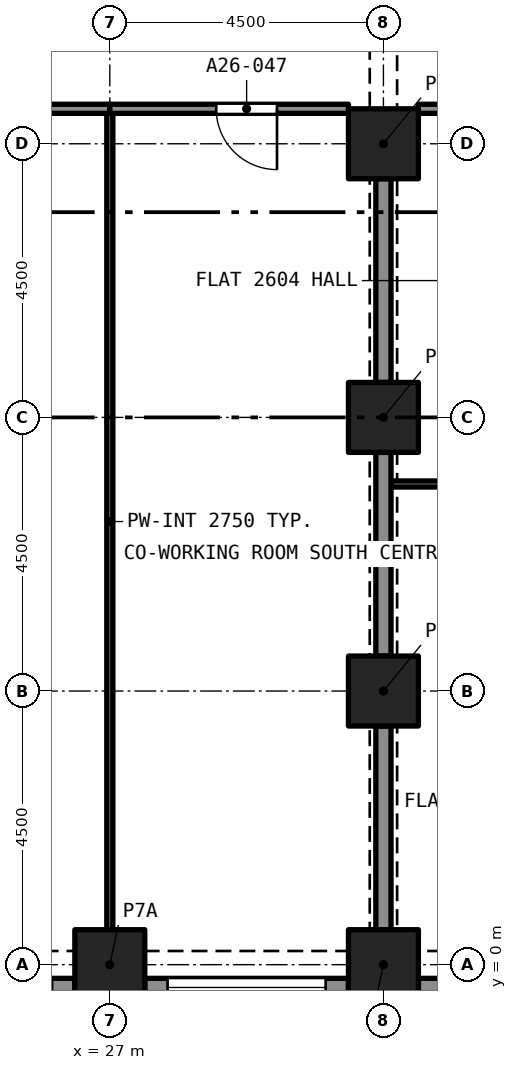
"""IFC4 building model, lengths in metres.
Left out: names, types, materials, properties, quantities, classifications, styles, units other than length and angle.
Written with IfcOpenShell. Run it as: python <this file> out.ifc"""

import sys

from ifc_helpers import new_model, si_unit, direction, frame, frame_2d, origin, origin_2d, place, context, subcontext, project, spatial, rectangle, extrude, element, fill, save


model = new_model("IFC4")
c1 = context("Model", 3, precision=1e-05, world=origin(), true_north=direction((0.0, 1.0)))
c2 = subcontext(c1, "Body", "Model", "MODEL_VIEW")
j1 = project(units=[si_unit("LENGTHUNIT", "METRE"), si_unit("PLANEANGLEUNIT", "RADIAN")], contexts=[c1])
p1 = place(None, origin())
s1 = spatial("IfcSite", under=j1, at=p1, CompositionType="ELEMENT")
p2 = place(p1, origin())
s2 = spatial("IfcBuilding", under=s1, at=p2, CompositionType="ELEMENT")
p3 = place(p2, frame((0.0, 0.0, 96.0)))
s3 = spatial("IfcBuildingStorey", under=s2, at=p3, CompositionType="ELEMENT", Elevation=96.0)
for number, where, z_axis, x_axis in (
    (1, (27.0, 0.0, 0.0), (0.0, 0.0, 1.0), (1.0, 0.0, 0.0)),
    (2, (31.5, 0.0, 0.0), (0.0, 0.0, 1.0), (1.0, 0.0, 0.0)),
    (3, (31.5, 4.5, 0.0), (0.0, 0.0, 1.0), (1.0, 0.0, 0.0)),
    (4, (31.5, 9.0, 0.0), (0.0, 0.0, 1.0), (1.0, 0.0, 0.0)),
    (5, (31.5, 13.5, 0.0), (0.0, 0.0, 1.0), (1.0, 0.0, 0.0)),
):
    element("IfcColumn", number, at=place(p3, frame(where, z_axis=z_axis, x_axis=x_axis)), inside=s3, PredefinedType="COLUMN", context=c2, shape_type="SweptSolid", body=[
        extrude(rectangle(XDim=1.15, YDim=1.15, at=origin_2d()), origin(), (0.0, 0.0, 1.0), 3.2),
    ])
p4 = place(p3, frame((26.425, -0.375, 0.0), z_axis=(0.0, 0.0, 1.0), x_axis=(-1.0, 0.0, 0.0)))
e6 = element("IfcWall", 6, at=p4, inside=s3, PredefinedType="SOLIDWALL", context=c2, shape_type="SweptSolid", body=[
    extrude(rectangle(XDim=3.35, YDim=0.3, at=frame_2d((1.675, 0.0))), origin(), (0.0, 0.0, 1.0), 3.2),
])
p5 = place(p4, frame((0.375, 0.0, 0.45)))
e7 = element("IfcOpeningElement", 7, at=p5, cuts=e6, PredefinedType="OPENING", context=c2, shape_type="SweptSolid", body=[
    extrude(rectangle(XDim=2.6, YDim=1.95, at=frame_2d((1.3, 0.975))), frame((0.0, 0.16, 0.0), z_axis=(0.0, -1.0, 0.0), x_axis=(1.0, 0.0, 0.0)), (0.0, 0.0, 1.0), 0.32),
])
p6 = place(p3, frame((30.925, -0.375, 0.0), z_axis=(0.0, 0.0, 1.0), x_axis=(-1.0, 0.0, 0.0)))
e8 = element("IfcWall", 8, at=p6, inside=s3, PredefinedType="SOLIDWALL", context=c2, shape_type="SweptSolid", body=[
    extrude(rectangle(XDim=3.35, YDim=0.3, at=frame_2d((1.675, 0.0))), origin(), (0.0, 0.0, 1.0), 3.2),
])
p7 = place(p6, frame((0.375, 0.0, 0.45)))
e9 = element("IfcOpeningElement", 9, at=p7, cuts=e8, PredefinedType="OPENING", context=c2, shape_type="SweptSolid", body=[
    extrude(rectangle(XDim=2.6, YDim=1.95, at=frame_2d((1.3, 0.975))), frame((0.0, 0.16, 0.0), z_axis=(0.0, -1.0, 0.0), x_axis=(1.0, 0.0, 0.0)), (0.0, 0.0, 1.0), 0.32),
])
p8 = place(p3, frame((35.425, -0.375, 0.0), z_axis=(0.0, 0.0, 1.0), x_axis=(-1.0, 0.0, 0.0)))
e10 = element("IfcWall", 10, at=p8, inside=s3, PredefinedType="SOLIDWALL", context=c2, shape_type="SweptSolid", body=[
    extrude(rectangle(XDim=3.35, YDim=0.3, at=frame_2d((1.675, 0.0))), origin(), (0.0, 0.0, 1.0), 3.2),
])
p9 = place(p8, frame((0.375, 0.0, 0.45)))
e11 = element("IfcOpeningElement", 11, at=p9, cuts=e10, PredefinedType="OPENING", context=c2, shape_type="SweptSolid", body=[
    extrude(rectangle(XDim=2.6, YDim=1.95, at=frame_2d((1.3, 0.975))), frame((0.0, 0.16, 0.0), z_axis=(0.0, -1.0, 0.0), x_axis=(1.0, 0.0, 0.0)), (0.0, 0.0, 1.0), 0.32),
])
p10 = place(p3, frame((36.0, 7.905, 0.0), z_axis=(0.0, 0.0, 1.0), x_axis=(-1.0, 0.0, 0.0)))
e12 = element("IfcWall", 12, at=p10, inside=s3, PredefinedType="PARTITIONING", context=c2, shape_type="SweptSolid", body=[
    extrude(rectangle(XDim=4.375, YDim=0.1, at=frame_2d((2.188, 0.0))), origin(), (0.0, 0.0, 1.0), 2.9),
])
p11 = place(p10, frame((1.75, 0.0, 0.0)))
e13 = element("IfcOpeningElement", 13, at=p11, cuts=e12, PredefinedType="OPENING", context=c2, shape_type="SweptSolid", body=[
    extrude(rectangle(XDim=1.0, YDim=2.1, at=frame_2d((0.5, 1.05))), frame((0.0, 0.06, 0.0), z_axis=(0.0, -1.0, 0.0), x_axis=(1.0, 0.0, 0.0)), (0.0, 0.0, 1.0), 0.12),
])
p12 = place(p3, frame((31.5, 9.575, 0.0), z_axis=(0.0, 0.0, 1.0), x_axis=(0.0, 1.0, 0.0)))
e14 = element("IfcWall", 14, at=p12, inside=s3, PredefinedType="PARTITIONING", context=c2, shape_type="SweptSolid", body=[
    extrude(rectangle(XDim=3.35, YDim=0.25, at=frame_2d((1.675, 0.0))), origin(), (0.0, 0.0, 1.0), 2.38),
])
p13 = place(p3, frame((34.425, 14.075, 0.0), z_axis=(0.0, 0.0, 1.0), x_axis=(-1.0, 0.0, 0.0)))
e15 = element("IfcWall", 15, at=p13, inside=s3, PredefinedType="PARTITIONING", context=c2, shape_type="SweptSolid", body=[
    extrude(rectangle(XDim=2.35, YDim=0.15, at=frame_2d((1.175, 0.0))), origin(), (0.0, 0.0, 1.0), 2.9),
])
p14 = place(p13, frame((0.175, 0.0, 0.0)))
e16 = element("IfcOpeningElement", 16, at=p14, cuts=e15, PredefinedType="OPENING", context=c2, shape_type="SweptSolid", body=[
    extrude(rectangle(XDim=1.0, YDim=2.1, at=frame_2d((0.5, 1.05))), frame((0.0, 0.085, 0.0), z_axis=(0.0, -1.0, 0.0), x_axis=(1.0, 0.0, 0.0)), (0.0, 0.0, 1.0), 0.17),
])
for number, where, z_axis, x_axis in (
    (17, (31.5, 0.575, 0.0), (0.0, 0.0, 1.0), (0.0, 1.0, 0.0)),
    (18, (31.5, 5.075, 0.0), (0.0, 0.0, 1.0), (0.0, 1.0, 0.0)),
):
    element("IfcWall", number, at=place(p3, frame(where, z_axis=z_axis, x_axis=x_axis)), inside=s3, PredefinedType="PARTITIONING", context=c2, shape_type="SweptSolid", body=[
        extrude(rectangle(XDim=3.35, YDim=0.25, at=frame_2d((1.675, 0.0))), origin(), (0.0, 0.0, 1.0), 2.38),
    ])
p15 = place(p3, frame((27.0, 0.575, 0.0), z_axis=(0.0, 0.0, 1.0), x_axis=(0.0, 1.0, 0.0)))
e19 = element("IfcWall", 19, at=p15, inside=s3, PredefinedType="PARTITIONING", context=c2, shape_type="SweptSolid", body=[
    extrude(rectangle(XDim=13.425, YDim=0.1, at=frame_2d((6.712, 0.0))), origin(), (0.0, 0.0, 1.0), 2.75),
])
p16 = place(p3, frame((27.0, 14.075, 0.0), z_axis=(0.0, 0.0, 1.0), x_axis=(-1.0, 0.0, 0.0)))
e20 = element("IfcWall", 20, at=p16, inside=s3, PredefinedType="PARTITIONING", context=c2, shape_type="SweptSolid", body=[
    extrude(rectangle(XDim=8.425, YDim=0.15, at=frame_2d((4.212, 0.0))), origin(), (0.0, 0.0, 1.0), 2.75),
])
p17 = place(p16, frame((4.0, 0.0, 0.0)))
e21 = element("IfcOpeningElement", 21, at=p17, cuts=e20, PredefinedType="OPENING", context=c2, shape_type="SweptSolid", body=[
    extrude(rectangle(XDim=1.0, YDim=2.1, at=frame_2d((0.5, 1.05))), frame((0.0, 0.085, 0.0), z_axis=(0.0, -1.0, 0.0), x_axis=(1.0, 0.0, 0.0)), (0.0, 0.0, 1.0), 0.17),
])
p18 = place(p3, frame((30.925, 14.075, 0.0), z_axis=(0.0, 0.0, 1.0), x_axis=(-1.0, 0.0, 0.0)))
e22 = element("IfcWall", 22, at=p18, inside=s3, PredefinedType="PARTITIONING", context=c2, shape_type="SweptSolid", body=[
    extrude(rectangle(XDim=3.925, YDim=0.15, at=frame_2d((1.962, 0.0))), origin(), (0.0, 0.0, 1.0), 2.75),
])
p19 = place(p18, frame((1.175, 0.0, 0.0)))
e23 = element("IfcOpeningElement", 23, at=p19, cuts=e22, PredefinedType="OPENING", context=c2, shape_type="SweptSolid", body=[
    extrude(rectangle(XDim=1.0, YDim=2.1, at=frame_2d((0.5, 1.05))), frame((0.0, 0.085, 0.0), z_axis=(0.0, -1.0, 0.0), x_axis=(1.0, 0.0, 0.0)), (0.0, 0.0, 1.0), 0.17),
])
p20 = place(p7, origin())
e24 = element("IfcWindow", 24, at=p20, inside=s3, PartitioningType="SINGLE_PANEL", PredefinedType="WINDOW", context=c2, shape_type="SweptSolid", body=[
    extrude(rectangle(XDim=2.6, YDim=1.95, at=frame_2d((1.3, 0.975))), frame((0.0, 0.03, 0.0), z_axis=(0.0, -1.0, 0.0), x_axis=(1.0, 0.0, 0.0)), (0.0, 0.0, 1.0), 0.06),
])
fill(e9, e24)
p21 = place(p19, origin())
e25 = element("IfcDoor", 25, at=p21, inside=s3, OperationType="SINGLE_SWING_LEFT", PredefinedType="DOOR", context=c2, shape_type="SweptSolid", body=[
    extrude(rectangle(XDim=1.0, YDim=2.1, at=frame_2d((0.5, 1.05))), frame((0.0, 0.025, 0.0), z_axis=(0.0, -1.0, 0.0), x_axis=(1.0, 0.0, 0.0)), (0.0, 0.0, 1.0), 0.05),
])
fill(e23, e25)
save(model, sys.argv[1])
